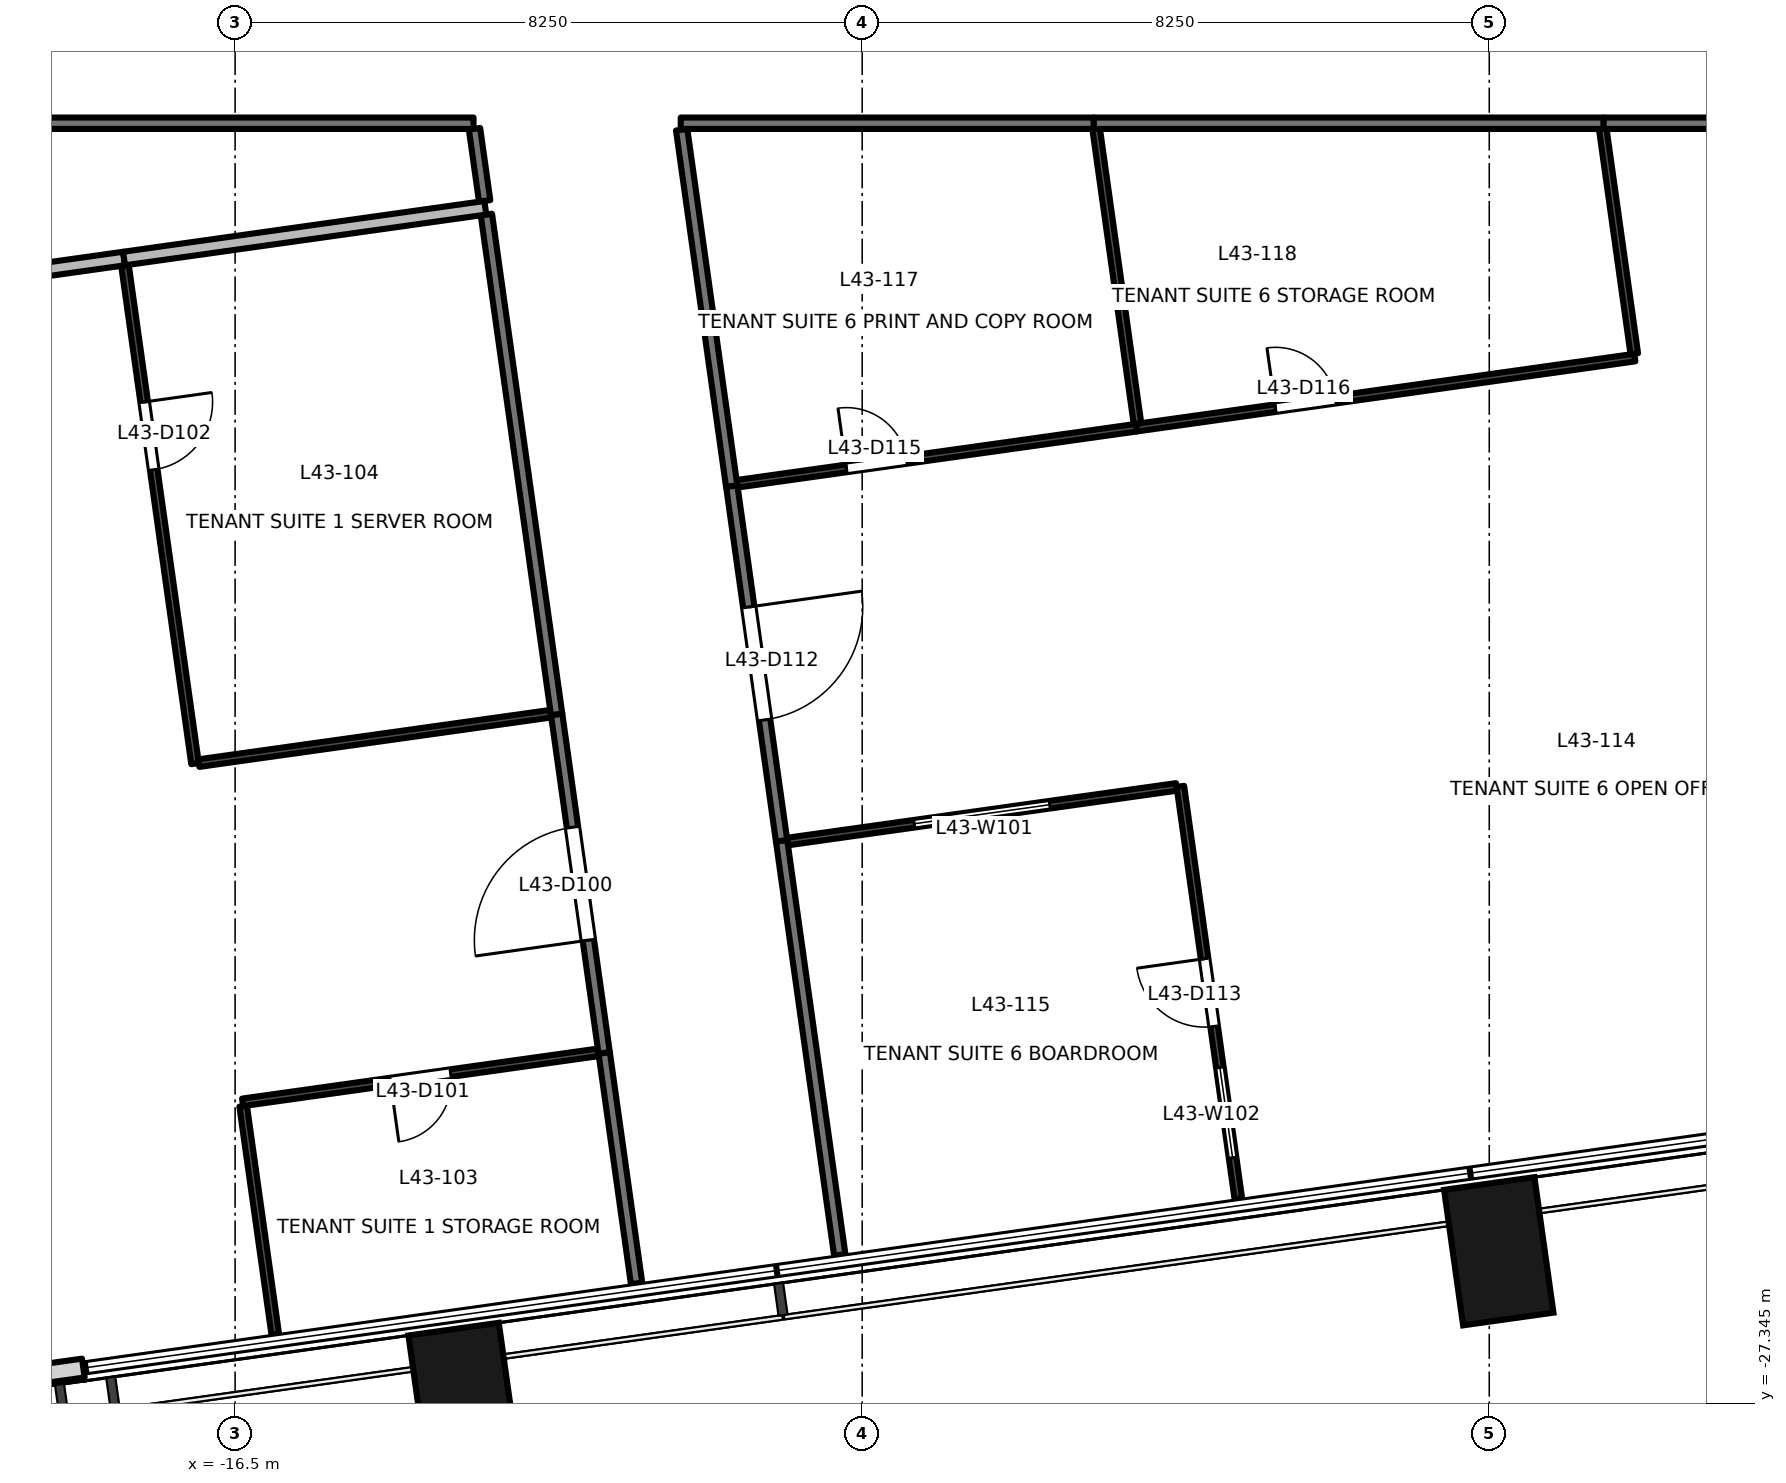
"""IFC4 building model, lengths in metres.
Left out: names, types, materials, properties, quantities, classifications, styles, units other than length and angle.
Written with IfcOpenShell. Run it as: python <this file> out.ifc"""

import sys

from ifc_helpers import new_model, si_unit, direction, frame, frame_2d, origin, origin_2d, place, context, subcontext, project, spatial, rectangle, extrude, element, fill, save


model = new_model("IFC4")
c1 = context("Model", 3, precision=1e-05, world=origin(), true_north=direction((0.0, 1.0)))
c2 = subcontext(c1, "Body", "Model", "MODEL_VIEW")
j1 = project(units=[si_unit("LENGTHUNIT", "METRE"), si_unit("PLANEANGLEUNIT", "RADIAN")], contexts=[c1])
p1 = place(None, origin())
s1 = spatial("IfcSite", under=j1, at=p1, CompositionType="ELEMENT")
p2 = place(p1, origin())
s2 = spatial("IfcBuilding", under=s1, at=p2, CompositionType="ELEMENT")
p3 = place(p2, frame((0.0, 0.0, 188.0)))
s3 = spatial("IfcBuildingStorey", under=s2, at=p3, CompositionType="ELEMENT", Elevation=188.0)
for number, where, z_axis, x_axis in (
    (1, (-13.5, -27.256, -0.2), (0.0, 0.0, 1.0), (0.99, 0.139, 0.0)),
    (2, (0.125, -25.34, -0.2), (0.0, 0.0, 1.0), (0.99, 0.139, 0.0)),
):
    element("IfcColumn", number, at=place(p3, frame(where, z_axis=z_axis, x_axis=x_axis)), inside=s3, PredefinedType="COLUMN", context=c2, shape_type="SweptSolid", body=[
        extrude(rectangle(XDim=1.2, YDim=1.8, at=origin_2d()), origin(), (0.0, 0.0, 1.0), 3.9),
    ])
p4 = place(p3, frame((-21.422, -27.288, 0.0), z_axis=(0.0, 0.0, 1.0), x_axis=(0.990246427036, 0.139327002919, 0.0)))
e3 = element("IfcWall", 3, at=p4, inside=s3, PredefinedType="SOLIDWALL", context=c2, shape_type="SweptSolid", body=[
    extrude(rectangle(XDim=2.954, YDim=0.25, at=frame_2d((1.477, 0.0))), origin(), (0.0, 0.0, 1.0), 3.7),
])
p5 = place(p3, frame((-11.644, -22.733, 0.0), z_axis=(0.0, 0.0, 1.0), x_axis=(-0.139081954514, 0.990280874262, 0.0)))
e4 = element("IfcWall", 4, at=p5, inside=s3, PredefinedType="PARTITIONING", context=c2, shape_type="SweptSolid", body=[
    extrude(rectangle(XDim=4.501, YDim=0.15, at=frame_2d((2.25, 0.0))), origin(), (0.0, 0.0, 1.0), 3.7),
])
p6 = place(p5, frame((1.5, 0.0, 0.0)))
e5 = element("IfcOpeningElement", 5, at=p6, cuts=e4, PredefinedType="OPENING", context=c2, shape_type="SweptSolid", body=[
    extrude(rectangle(XDim=1.5, YDim=2.1, at=frame_2d((0.75, 1.05))), frame((0.0, 0.085, 0.0), z_axis=(0.0, -1.0, 0.0), x_axis=(1.0, 0.0, 0.0)), (0.0, 0.0, 1.0), 0.171),
])
p7 = place(p3, frame((-11.218, -25.763, 0.0), z_axis=(0.0, 0.0, 1.0), x_axis=(-0.139187613425, 0.990266029039, 0.0)))
e6 = element("IfcWall", 6, at=p7, inside=s3, PredefinedType="PARTITIONING", context=c2, shape_type="SweptSolid", body=[
    extrude(rectangle(XDim=3.061, YDim=0.15, at=frame_2d((1.53, 0.0))), origin(), (0.0, 0.0, 1.0), 3.7),
])
p8 = place(p3, frame((-12.27, -18.277, 0.0), z_axis=(0.0, 0.0, 1.0), x_axis=(-0.139151184207, 0.990271148693, 0.0)))
e7 = element("IfcWall", 7, at=p8, inside=s3, PredefinedType="PARTITIONING", context=c2, shape_type="SweptSolid", body=[
    extrude(rectangle(XDim=6.641, YDim=0.15, at=frame_2d((3.32, 0.0))), origin(), (0.0, 0.0, 1.0), 3.7),
])
p9 = place(p3, frame((-13.363, -10.5, 0.0), z_axis=(0.0, 0.0, 1.0), x_axis=(-1.0, 0.0, 0.0)))
e8 = element("IfcWall", 8, at=p9, inside=s3, PredefinedType="PARTITIONING", context=c2, shape_type="SweptSolid", body=[
    extrude(rectangle(XDim=7.262, YDim=0.15, at=frame_2d((3.631, 0.0))), origin(), (0.0, 0.0, 1.0), 2.8),
])
p10 = place(p3, frame((-13.217, -11.522, 0.0), z_axis=(0.0, 0.0, 1.0), x_axis=(-0.138852741578, 0.990313039476, 0.0)))
e9 = element("IfcWall", 9, at=p10, inside=s3, PredefinedType="PARTITIONING", context=c2, shape_type="SweptSolid", body=[
    extrude(rectangle(XDim=0.958, YDim=0.15, at=frame_2d((0.479, 0.0))), origin(), (0.0, 0.0, 1.0), 2.8),
])
p11 = place(p3, frame((-9.966, -15.273, 0.0), z_axis=(0.0, 0.0, 1.0), x_axis=(0.139137407344, -0.990273084496, 0.0)))
e10 = element("IfcWall", 10, at=p11, inside=s3, PredefinedType="PARTITIONING", context=c2, shape_type="SweptSolid", body=[
    extrude(rectangle(XDim=4.715, YDim=0.15, at=frame_2d((2.357, 0.0))), origin(), (0.0, 0.0, 1.0), 3.7),
])
p12 = place(p11, frame((1.607, 0.0, 0.0)))
e11 = element("IfcOpeningElement", 11, at=p12, cuts=e10, PredefinedType="OPENING", context=c2, shape_type="SweptSolid", body=[
    extrude(rectangle(XDim=1.5, YDim=2.1, at=frame_2d((0.75, 1.05))), frame((0.0, 0.085, 0.0), z_axis=(0.0, -1.0, 0.0), x_axis=(1.0, 0.0, 0.0)), (0.0, 0.0, 1.0), 0.171),
])
p13 = place(p3, frame((6.006, -10.5, 0.0), z_axis=(0.0, 0.0, 1.0), x_axis=(-1.0, 0.0, 0.0)))
e12 = element("IfcWall", 12, at=p13, inside=s3, PredefinedType="PARTITIONING", context=c2, shape_type="SweptSolid", body=[
    extrude(rectangle(XDim=4.504, YDim=0.15, at=frame_2d((2.252, 0.0))), origin(), (0.0, 0.0, 1.0), 2.9),
])
p14 = place(p3, frame((-9.31, -19.941, 0.0), z_axis=(0.0, 0.0, 1.0), x_axis=(0.139103174181, -0.990277893792, 0.0)))
e13 = element("IfcWall", 13, at=p14, inside=s3, PredefinedType="PARTITIONING", context=c2, shape_type="SweptSolid", body=[
    extrude(rectangle(XDim=5.5, YDim=0.15, at=frame_2d((2.75, 0.0))), origin(), (0.0, 0.0, 1.0), 2.8),
])
p15 = place(p3, frame((-10.625, -10.585, 0.0), z_axis=(0.0, 0.0, 1.0), x_axis=(0.138987741071, -0.990294101685, 0.0)))
e14 = element("IfcWall", 14, at=p15, inside=s3, PredefinedType="PARTITIONING", context=c2, shape_type="SweptSolid", body=[
    extrude(rectangle(XDim=4.734, YDim=0.15, at=frame_2d((2.367, 0.0))), origin(), (0.0, 0.0, 1.0), 3.7),
])
p16 = place(p3, frame((-5.203, -10.5, 0.0), z_axis=(0.0, 0.0, 1.0), x_axis=(-1.0, 0.0, 0.0)))
e15 = element("IfcWall", 15, at=p16, inside=s3, PredefinedType="PARTITIONING", context=c2, shape_type="SweptSolid", body=[
    extrude(rectangle(XDim=5.434, YDim=0.15, at=frame_2d((2.717, 0.0))), origin(), (0.0, 0.0, 1.0), 2.8),
])
p17 = place(p3, frame((1.502, -10.5, 0.0), z_axis=(0.0, 0.0, 1.0), x_axis=(-1.0, 0.0, 0.0)))
e16 = element("IfcWall", 16, at=p17, inside=s3, PredefinedType="PARTITIONING", context=c2, shape_type="SweptSolid", body=[
    extrude(rectangle(XDim=6.705, YDim=0.15, at=frame_2d((3.353, 0.0))), origin(), (0.0, 0.0, 1.0), 2.9),
])
p18 = place(p3, frame((-16.394, -23.431, 0.0), z_axis=(0.0, 0.0, 1.0), x_axis=(0.139333854614, -0.990245462983, 0.0)))
e17 = element("IfcWall", 17, at=p18, inside=s3, PredefinedType="PARTITIONING", context=c2, shape_type="SweptSolid", body=[
    extrude(rectangle(XDim=3.03, YDim=0.1, at=frame_2d((1.515, 0.0))), origin(), (0.0, 0.0, 1.0), 3.7),
])
p19 = place(p3, frame((-11.721, -22.723, 0.0), z_axis=(0.0, 0.0, 1.0), x_axis=(-0.990254018594, -0.139273036368, 0.0)))
e18 = element("IfcWall", 18, at=p19, inside=s3, PredefinedType="PARTITIONING", context=c2, shape_type="SweptSolid", body=[
    extrude(rectangle(XDim=4.726, YDim=0.1, at=frame_2d((2.363, 0.0))), origin(), (0.0, 0.0, 1.0), 2.8),
])
p20 = place(p19, frame((1.963, 0.0, 0.0)))
e19 = element("IfcOpeningElement", 19, at=p20, cuts=e18, PredefinedType="OPENING", context=c2, shape_type="SweptSolid", body=[
    extrude(rectangle(XDim=0.8, YDim=2.1, at=frame_2d((0.4, 1.05))), frame((0.0, 0.061, 0.0), z_axis=(0.0, -1.0, 0.0), x_axis=(1.0, 0.0, 0.0)), (0.0, 0.0, 1.0), 0.121),
])
p21 = place(p3, frame((-17.949, -12.369, 0.0), z_axis=(0.0, 0.0, 1.0), x_axis=(0.1392424012, -0.990258326755, 0.0)))
e20 = element("IfcWall", 20, at=p21, inside=s3, PredefinedType="PARTITIONING", context=c2, shape_type="SweptSolid", body=[
    extrude(rectangle(XDim=6.621, YDim=0.1, at=frame_2d((3.31, 0.0))), origin(), (0.0, 0.0, 1.0), 3.7),
])
p22 = place(p21, frame((1.816, 0.0, 0.0)))
e21 = element("IfcOpeningElement", 21, at=p22, cuts=e20, PredefinedType="OPENING", context=c2, shape_type="SweptSolid", body=[
    extrude(rectangle(XDim=0.9, YDim=2.1, at=frame_2d((0.45, 1.05))), frame((0.0, 0.061, 0.0), z_axis=(0.0, -1.0, 0.0), x_axis=(1.0, 0.0, 0.0)), (0.0, 0.0, 1.0), 0.121),
])
p23 = place(p3, frame((-16.977, -18.918, 0.0), z_axis=(0.0, 0.0, 1.0), x_axis=(0.990292211818, 0.139001205793, 0.0)))
e22 = element("IfcWall", 22, at=p23, inside=s3, PredefinedType="PARTITIONING", context=c2, shape_type="SweptSolid", body=[
    extrude(rectangle(XDim=4.676, YDim=0.1, at=frame_2d((2.338, 0.0))), origin(), (0.0, 0.0, 1.0), 2.8),
])
p24 = place(p3, frame((-26.183, -13.436, 0.0), z_axis=(0.0, 0.0, 1.0), x_axis=(0.990260506457, 0.139226898809, 0.0)))
e23 = element("IfcWall", 23, at=p24, inside=s3, PredefinedType="PARTITIONING", context=c2, shape_type="SweptSolid", body=[
    extrude(rectangle(XDim=8.303, YDim=0.18, at=frame_2d((4.151, 0.0))), origin(), (0.0, 0.0, 1.0), 3.7),
])
p25 = place(p3, frame((-17.961, -12.28, 0.0), z_axis=(0.0, 0.0, 1.0), x_axis=(0.990268412035, 0.139170658277, 0.0)))
e24 = element("IfcWall", 24, at=p25, inside=s3, PredefinedType="PARTITIONING", context=c2, shape_type="SweptSolid", body=[
    extrude(rectangle(XDim=4.8, YDim=0.18, at=frame_2d((2.4, 0.0))), origin(), (0.0, 0.0, 1.0), 2.8),
])
p26 = place(p3, frame((-4.114, -19.231, 0.0), z_axis=(0.0, 0.0, 1.0), x_axis=(-0.990279259335, -0.139093452508, 0.0)))
e25 = element("IfcWall", 25, at=p26, inside=s3, PredefinedType="PARTITIONING", context=c2, shape_type="SweptSolid", body=[
    extrude(rectangle(XDim=5.169, YDim=0.1, at=frame_2d((2.584, 0.0))), origin(), (0.0, 0.0, 1.0), 2.8),
])
p27 = place(p26, frame((1.685, 0.0, 0.9)))
e26 = element("IfcOpeningElement", 26, at=p27, cuts=e25, PredefinedType="OPENING", context=c2, shape_type="SweptSolid", body=[
    extrude(rectangle(XDim=1.8, YDim=1.2, at=frame_2d((0.9, 0.6))), frame((0.0, 0.061, 0.0), z_axis=(0.0, -1.0, 0.0), x_axis=(1.0, 0.0, 0.0)), (0.0, 0.0, 1.0), 0.121),
])
p28 = place(p3, frame((-3.301, -24.65, 0.0), z_axis=(0.0, 0.0, 1.0), x_axis=(-0.139243907894, 0.990258114894, 0.0)))
e27 = element("IfcWall", 27, at=p28, inside=s3, PredefinedType="PARTITIONING", context=c2, shape_type="SweptSolid", body=[
    extrude(rectangle(XDim=5.479, YDim=0.1, at=frame_2d((2.74, 0.0))), origin(), (0.0, 0.0, 1.0), 3.7),
])
p29 = place(p28, frame((2.29, 0.0, 0.0)))
e28 = element("IfcOpeningElement", 28, at=p29, cuts=e27, PredefinedType="OPENING", context=c2, shape_type="SweptSolid", body=[
    extrude(rectangle(XDim=0.9, YDim=2.1, at=frame_2d((0.45, 1.05))), frame((0.0, 0.061, 0.0), z_axis=(0.0, -1.0, 0.0), x_axis=(1.0, 0.0, 0.0)), (0.0, 0.0, 1.0), 0.121),
])
p30 = place(p28, frame((0.545, 0.0, 0.9)))
e29 = element("IfcOpeningElement", 29, at=p30, cuts=e27, PredefinedType="OPENING", context=c2, shape_type="SweptSolid", body=[
    extrude(rectangle(XDim=1.2, YDim=1.2, at=frame_2d((0.6, 0.6))), frame((0.0, 0.061, 0.0), z_axis=(0.0, -1.0, 0.0), x_axis=(1.0, 0.0, 0.0)), (0.0, 0.0, 1.0), 0.121),
])
p31 = place(p3, frame((-9.895, -15.243, 0.0), z_axis=(0.0, 0.0, 1.0), x_axis=(0.99027719117, 0.139108176064, 0.0)))
e30 = element("IfcWall", 30, at=p31, inside=s3, PredefinedType="PARTITIONING", context=c2, shape_type="SweptSolid", body=[
    extrude(rectangle(XDim=5.305, YDim=0.1, at=frame_2d((2.653, 0.0))), origin(), (0.0, 0.0, 1.0), 2.8),
])
p32 = place(p31, frame((1.452, 0.0, 0.0)))
e31 = element("IfcOpeningElement", 31, at=p32, cuts=e30, PredefinedType="OPENING", context=c2, shape_type="SweptSolid", body=[
    extrude(rectangle(XDim=0.8, YDim=2.1, at=frame_2d((0.4, 1.05))), frame((0.0, 0.061, 0.0), z_axis=(0.0, -1.0, 0.0), x_axis=(1.0, 0.0, 0.0)), (0.0, 0.0, 1.0), 0.121),
])
p33 = place(p3, frame((-4.641, -14.505, 0.0), z_axis=(0.0, 0.0, 1.0), x_axis=(0.990258326755, 0.1392424012, 0.0)))
e32 = element("IfcWall", 32, at=p33, inside=s3, PredefinedType="PARTITIONING", context=c2, shape_type="SweptSolid", body=[
    extrude(rectangle(XDim=6.621, YDim=0.1, at=frame_2d((3.31, 0.0))), origin(), (0.0, 0.0, 1.0), 2.9),
])
p34 = place(p33, frame((1.846, 0.0, 0.0)))
e33 = element("IfcOpeningElement", 33, at=p34, cuts=e32, PredefinedType="OPENING", context=c2, shape_type="SweptSolid", body=[
    extrude(rectangle(XDim=0.8, YDim=2.1, at=frame_2d((0.4, 1.05))), frame((0.0, 0.061, 0.0), z_axis=(0.0, -1.0, 0.0), x_axis=(1.0, 0.0, 0.0)), (0.0, 0.0, 1.0), 0.121),
])
p35 = place(p3, frame((1.908, -13.533, 0.0), z_axis=(0.0, 0.0, 1.0), x_axis=(-0.138954956276, 0.990298702476, 0.0)))
e34 = element("IfcWall", 34, at=p35, inside=s3, PredefinedType="PARTITIONING", context=c2, shape_type="SweptSolid", body=[
    extrude(rectangle(XDim=2.994, YDim=0.1, at=frame_2d((1.497, 0.0))), origin(), (0.0, 0.0, 1.0), 3.7),
])
p36 = place(p3, frame((-5.173, -10.568, 0.0), z_axis=(0.0, 0.0, 1.0), x_axis=(0.139006835826, -0.990291421549, 0.0)))
e35 = element("IfcWall", 35, at=p36, inside=s3, PredefinedType="PARTITIONING", context=c2, shape_type="SweptSolid", body=[
    extrude(rectangle(XDim=3.922, YDim=0.1, at=frame_2d((1.961, 0.0))), origin(), (0.0, 0.0, 1.0), 2.9),
])
p37 = place(p6, origin())
e36 = element("IfcDoor", 36, at=p37, inside=s3, OperationType="DOUBLE_DOOR_SINGLE_SWING", PredefinedType="DOOR", context=c2, shape_type="SweptSolid", body=[
    extrude(rectangle(XDim=1.5, YDim=2.1, at=frame_2d((0.75, 1.05))), frame((0.0, 0.025, 0.0), z_axis=(0.0, -1.0, 0.0), x_axis=(1.0, 0.0, 0.0)), (0.0, 0.0, 1.0), 0.05),
])
fill(e5, e36)
p38 = place(p20, origin())
e37 = element("IfcDoor", 37, at=p38, inside=s3, OperationType="SINGLE_SWING_RIGHT", PredefinedType="DOOR", context=c2, shape_type="SweptSolid", body=[
    extrude(rectangle(XDim=0.8, YDim=2.1, at=frame_2d((0.4, 1.05))), frame((0.0, 0.025, 0.0), z_axis=(0.0, -1.0, 0.0), x_axis=(1.0, 0.0, 0.0)), (0.0, 0.0, 1.0), 0.05),
])
fill(e19, e37)
p39 = place(p22, origin())
e38 = element("IfcDoor", 38, at=p39, inside=s3, OperationType="SINGLE_SWING_LEFT", PredefinedType="DOOR", context=c2, shape_type="SweptSolid", body=[
    extrude(rectangle(XDim=0.9, YDim=2.1, at=frame_2d((0.45, 1.05))), frame((0.0, 0.025, 0.0), z_axis=(0.0, -1.0, 0.0), x_axis=(1.0, 0.0, 0.0)), (0.0, 0.0, 1.0), 0.05),
])
fill(e21, e38)
p40 = place(p12, origin())
e39 = element("IfcDoor", 39, at=p40, inside=s3, OperationType="DOUBLE_DOOR_SINGLE_SWING", PredefinedType="DOOR", context=c2, shape_type="SweptSolid", body=[
    extrude(rectangle(XDim=1.5, YDim=2.1, at=frame_2d((0.75, 1.05))), frame((0.0, 0.025, 0.0), z_axis=(0.0, -1.0, 0.0), x_axis=(1.0, 0.0, 0.0)), (0.0, 0.0, 1.0), 0.05),
])
fill(e11, e39)
p41 = place(p29, origin())
e40 = element("IfcDoor", 40, at=p41, inside=s3, OperationType="SINGLE_SWING_RIGHT", PredefinedType="DOOR", context=c2, shape_type="SweptSolid", body=[
    extrude(rectangle(XDim=0.9, YDim=2.1, at=frame_2d((0.45, 1.05))), frame((0.0, 0.025, 0.0), z_axis=(0.0, -1.0, 0.0), x_axis=(1.0, 0.0, 0.0)), (0.0, 0.0, 1.0), 0.05),
])
fill(e28, e40)
p42 = place(p32, origin())
e41 = element("IfcDoor", 41, at=p42, inside=s3, OperationType="SINGLE_SWING_LEFT", PredefinedType="DOOR", context=c2, shape_type="SweptSolid", body=[
    extrude(rectangle(XDim=0.8, YDim=2.1, at=frame_2d((0.4, 1.05))), frame((0.0, 0.025, 0.0), z_axis=(0.0, -1.0, 0.0), x_axis=(1.0, 0.0, 0.0)), (0.0, 0.0, 1.0), 0.05),
])
fill(e31, e41)
p43 = place(p34, origin())
e42 = element("IfcDoor", 42, at=p43, inside=s3, OperationType="SINGLE_SWING_LEFT", PredefinedType="DOOR", context=c2, shape_type="SweptSolid", body=[
    extrude(rectangle(XDim=0.8, YDim=2.1, at=frame_2d((0.4, 1.05))), frame((0.0, 0.025, 0.0), z_axis=(0.0, -1.0, 0.0), x_axis=(1.0, 0.0, 0.0)), (0.0, 0.0, 1.0), 0.05),
])
fill(e33, e42)
p44 = place(p27, origin())
e43 = element("IfcWindow", 43, at=p44, inside=s3, PartitioningType="SINGLE_PANEL", PredefinedType="WINDOW", context=c2, shape_type="SweptSolid", body=[
    extrude(rectangle(XDim=1.8, YDim=1.2, at=frame_2d((0.9, 0.6))), frame((0.0, 0.03, 0.0), z_axis=(0.0, -1.0, 0.0), x_axis=(1.0, 0.0, 0.0)), (0.0, 0.0, 1.0), 0.06),
])
fill(e26, e43)
p45 = place(p30, origin())
e44 = element("IfcWindow", 44, at=p45, inside=s3, PartitioningType="SINGLE_PANEL", PredefinedType="WINDOW", context=c2, shape_type="SweptSolid", body=[
    extrude(rectangle(XDim=1.2, YDim=1.2, at=frame_2d((0.6, 0.6))), frame((0.0, 0.03, 0.0), z_axis=(0.0, -1.0, 0.0), x_axis=(1.0, 0.0, 0.0)), (0.0, 0.0, 1.0), 0.06),
])
fill(e29, e44)
save(model, sys.argv[1])
